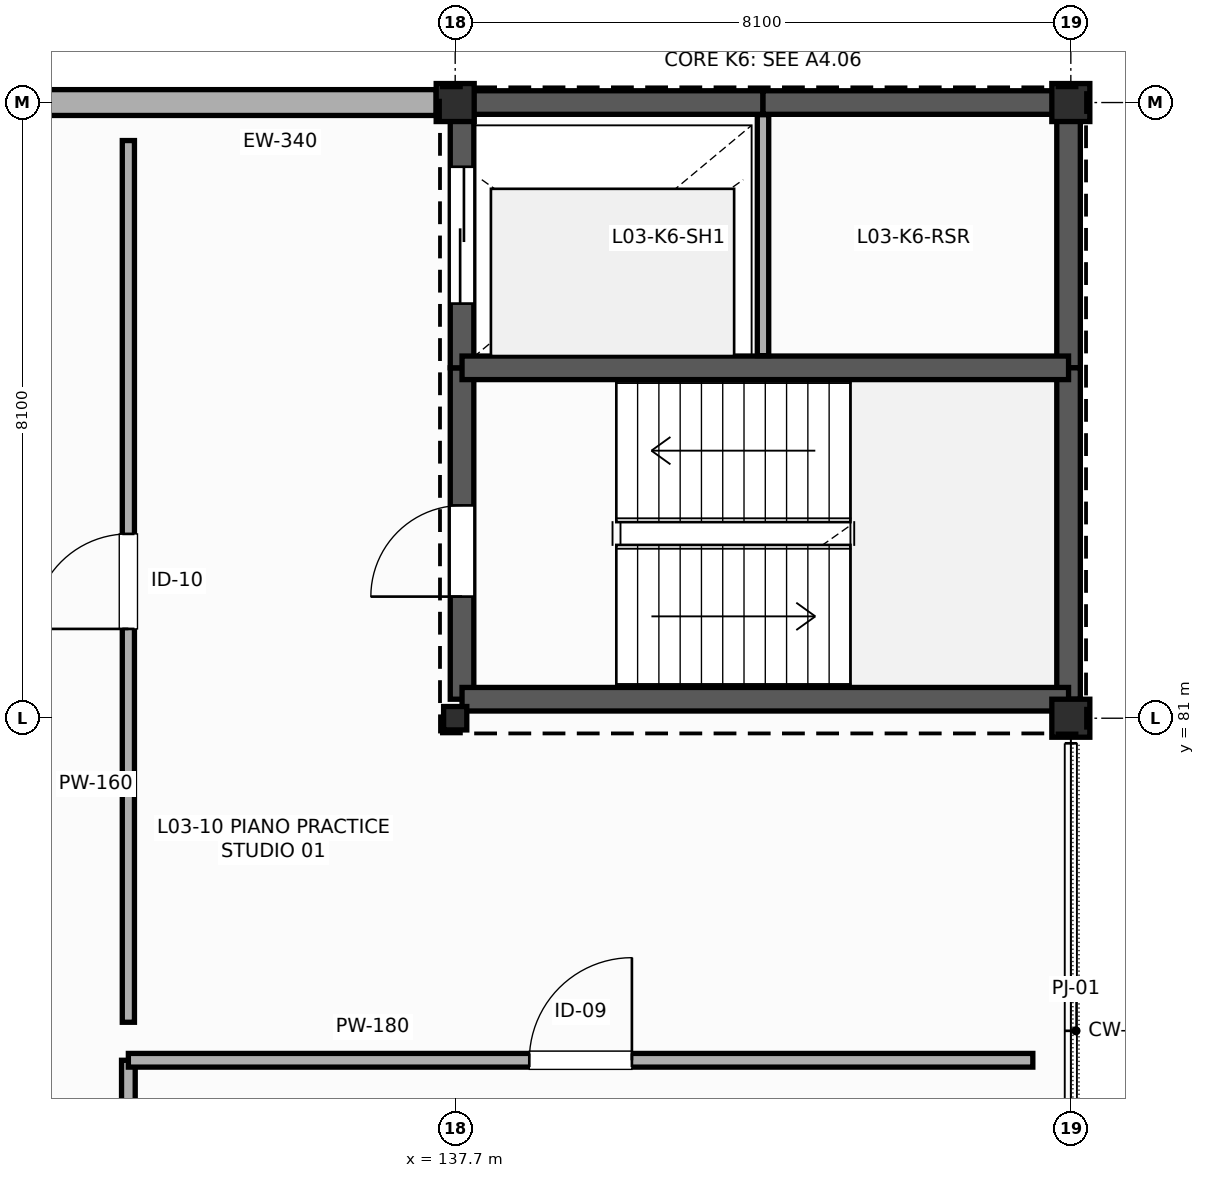
"""IFC4 building model, lengths in metres.
Left out: names, types, materials, properties, quantities, classifications, styles, units other than length and angle.
Written with IfcOpenShell. Run it as: python <this file> out.ifc"""

import sys

from ifc_helpers import new_model, si_unit, direction, frame, frame_2d, origin, origin_2d, place, context, subcontext, project, spatial, rectangle, i_section, extrude, element, fill, save


model = new_model("IFC4")
c1 = context("Model", 3, precision=1e-05, world=origin(), true_north=direction((0.0, 1.0)))
c2 = subcontext(c1, "Body", "Model", "MODEL_VIEW")
j1 = project(units=[si_unit("LENGTHUNIT", "METRE"), si_unit("PLANEANGLEUNIT", "RADIAN")], contexts=[c1])
p1 = place(None, origin())
s1 = spatial("IfcSite", under=j1, at=p1, CompositionType="ELEMENT")
p2 = place(p1, origin())
s2 = spatial("IfcBuilding", under=s1, at=p2, CompositionType="ELEMENT")
p3 = place(p2, frame((0.0, 0.0, 15.0)))
s3 = spatial("IfcBuildingStorey", under=s2, at=p3, CompositionType="ELEMENT", Elevation=15.0)
p4 = place(p3, frame((137.7, 81.0, 0.0), z_axis=(0.0, 0.0, 1.0), x_axis=(1.0, 0.0, 0.0)))
e1 = element("IfcColumn", 1, at=p4, inside=s3, PredefinedType="COLUMN", context=c2, shape_type="SweptSolid", body=[
    extrude(i_section(OverallWidth=0.305, OverallDepth=0.308, WebThickness=0.01, FlangeThickness=0.015, FilletRadius=0.015, at=origin_2d()), origin(), (0.0, 0.0, 1.0), 4.2),
])
for number, where, z_axis, x_axis in (
    (2, (137.7, 89.1, 0.0), (0.0, 0.0, 1.0), (1.0, 0.0, 0.0)),
    (3, (145.8, 81.0, 0.0), (0.0, 0.0, 1.0), (1.0, 0.0, 0.0)),
    (4, (145.8, 89.1, 0.0), (0.0, 0.0, 1.0), (1.0, 0.0, 0.0)),
):
    element("IfcColumn", number, at=place(p3, frame(where, z_axis=z_axis, x_axis=x_axis)), inside=s3, PredefinedType="COLUMN", context=c2, shape_type="SweptSolid", body=[
        extrude(rectangle(XDim=0.5, YDim=0.5, at=origin_2d()), origin(), (0.0, 0.0, 1.0), 4.2),
    ])
p5 = place(p3, frame((137.45, 89.1, 0.0), z_axis=(0.0, 0.0, 1.0), x_axis=(-1.0, 0.0, 0.0)))
e5 = element("IfcWall", 5, at=p5, inside=s3, PredefinedType="SOLIDWALL", context=c2, shape_type="SweptSolid", body=[
    extrude(rectangle(XDim=7.6, YDim=0.34, at=frame_2d((3.8, 0.0))), origin(), (0.0, 0.0, 1.0), 3.527),
])
p6 = place(p3, frame((137.79, 81.25, 0.0), z_axis=(0.0, 0.0, 1.0), x_axis=(0.0, 1.0, 0.0)))
e6 = element("IfcWall", 6, at=p6, inside=s3, PredefinedType="SHEAR", context=c2, shape_type="SweptSolid", body=[
    extrude(rectangle(XDim=4.36, YDim=0.31, at=frame_2d((2.18, 0.0))), origin(), (0.0, 0.0, 1.0), 4.2),
])
p7 = place(p6, frame((1.35, 0.0, 0.0)))
e7 = element("IfcOpeningElement", 7, at=p7, cuts=e6, PredefinedType="OPENING", context=c2, shape_type="SweptSolid", body=[
    extrude(rectangle(XDim=1.2, YDim=2.25, at=frame_2d((0.6, 1.125))), frame((0.0, 0.165, 0.0), z_axis=(0.0, -1.0, 0.0), x_axis=(1.0, 0.0, 0.0)), (0.0, 0.0, 1.0), 0.33),
])
p8 = place(p3, frame((137.79, 85.61, 0.0), z_axis=(0.0, 0.0, 1.0), x_axis=(0.0, 1.0, 0.0)))
e8 = element("IfcWall", 8, at=p8, inside=s3, PredefinedType="SHEAR", context=c2, shape_type="SweptSolid", body=[
    extrude(rectangle(XDim=3.49, YDim=0.31, at=frame_2d((1.745, 0.0))), origin(), (0.0, 0.0, 1.0), 4.2),
])
p9 = place(p8, frame((0.845, 0.0, 0.0)))
e9 = element("IfcOpeningElement", 9, at=p9, cuts=e8, PredefinedType="OPENING", context=c2, shape_type="SweptSolid", body=[
    extrude(rectangle(XDim=1.8, YDim=2.4, at=frame_2d((0.9, 1.2))), frame((0.0, 0.165, 0.0), z_axis=(0.0, -1.0, 0.0), x_axis=(1.0, 0.0, 0.0)), (0.0, 0.0, 1.0), 0.33),
])
p10 = place(p3, frame((137.79, 89.1, 0.0), z_axis=(0.0, 0.0, 1.0), x_axis=(1.0, 0.0, 0.0)))
e10 = element("IfcWall", 10, at=p10, inside=s3, PredefinedType="SHEAR", context=c2, shape_type="SweptSolid", body=[
    extrude(rectangle(XDim=3.96, YDim=0.31, at=frame_2d((1.98, 0.0))), origin(), (0.0, 0.0, 1.0), 4.2),
])
p11 = place(p3, frame((141.75, 89.1, 0.0), z_axis=(0.0, 0.0, 1.0), x_axis=(1.0, 0.0, 0.0)))
e11 = element("IfcWall", 11, at=p11, inside=s3, PredefinedType="SHEAR", context=c2, shape_type="SweptSolid", body=[
    extrude(rectangle(XDim=4.02, YDim=0.31, at=frame_2d((2.01, 0.0))), origin(), (0.0, 0.0, 1.0), 4.2),
])
p12 = place(p3, frame((145.77, 89.1, 0.0), z_axis=(0.0, 0.0, 1.0), x_axis=(0.0, -1.0, 0.0)))
e12 = element("IfcWall", 12, at=p12, inside=s3, PredefinedType="SHEAR", context=c2, shape_type="SweptSolid", body=[
    extrude(rectangle(XDim=3.49, YDim=0.31, at=frame_2d((1.745, 0.0))), origin(), (0.0, 0.0, 1.0), 4.2),
])
p13 = place(p3, frame((145.77, 85.61, 0.0), z_axis=(0.0, 0.0, 1.0), x_axis=(0.0, -1.0, 0.0)))
e13 = element("IfcWall", 13, at=p13, inside=s3, PredefinedType="SHEAR", context=c2, shape_type="SweptSolid", body=[
    extrude(rectangle(XDim=4.36, YDim=0.31, at=frame_2d((2.18, 0.0))), origin(), (0.0, 0.0, 1.0), 4.2),
])
for number, where, z_axis, x_axis in (
    (14, (145.77, 81.25, 0.0), (0.0, 0.0, 1.0), (-1.0, 0.0, 0.0)),
    (15, (137.79, 85.61, 0.0), (0.0, 0.0, 1.0), (1.0, 0.0, 0.0)),
):
    element("IfcWall", number, at=place(p3, frame(where, z_axis=z_axis, x_axis=x_axis)), inside=s3, PredefinedType="SHEAR", context=c2, shape_type="SweptSolid", body=[
        extrude(rectangle(XDim=7.98, YDim=0.31, at=frame_2d((3.99, 0.0))), origin(), (0.0, 0.0, 1.0), 4.2),
    ])
p14 = place(p3, frame((141.75, 85.77, 0.0), z_axis=(0.0, 0.0, 1.0), x_axis=(0.0, 1.0, 0.0)))
e16 = element("IfcWall", 16, at=p14, inside=s3, PredefinedType="PLUMBINGWALL", context=c2, shape_type="SweptSolid", body=[
    extrude(rectangle(XDim=3.17, YDim=0.15, at=frame_2d((1.585, 0.0))), origin(), (0.0, 0.0, 1.0), 3.85),
])
p15 = place(p3, frame((133.4, 67.0, 0.0), z_axis=(0.0, 0.0, 1.0), x_axis=(0.0, 1.0, 0.0)))
e17 = element("IfcWall", 17, at=p15, inside=s3, PredefinedType="PARTITIONING", context=c2, shape_type="SweptSolid", body=[
    extrude(rectangle(XDim=9.5, YDim=0.18, at=frame_2d((4.75, 0.0))), origin(), (0.0, 0.0, 1.0), 3.92),
])
p16 = place(p3, frame((133.4, 76.5, 0.0), z_axis=(0.0, 0.0, 1.0), x_axis=(1.0, 0.0, 0.0)))
e18 = element("IfcWall", 18, at=p16, inside=s3, PredefinedType="PARTITIONING", context=c2, shape_type="SweptSolid", body=[
    extrude(rectangle(XDim=11.9, YDim=0.18, at=frame_2d((5.95, 0.0))), origin(), (0.0, 0.0, 1.0), 3.92),
])
p17 = place(p16, frame((5.275, 0.0, 0.0)))
e19 = element("IfcOpeningElement", 19, at=p17, cuts=e18, PredefinedType="OPENING", context=c2, shape_type="SweptSolid", body=[
    extrude(rectangle(XDim=1.35, YDim=2.3, at=frame_2d((0.675, 1.15))), frame((0.0, 0.1, 0.0), z_axis=(0.0, -1.0, 0.0), x_axis=(1.0, 0.0, 0.0)), (0.0, 0.0, 1.0), 0.2),
])
p18 = place(p3, frame((133.4, 77.0, 0.0), z_axis=(0.0, 0.0, 1.0), x_axis=(0.0, 1.0, 0.0)))
e20 = element("IfcWall", 20, at=p18, inside=s3, PredefinedType="PARTITIONING", context=c2, shape_type="SweptSolid", body=[
    extrude(rectangle(XDim=11.6, YDim=0.16, at=frame_2d((5.8, 0.0))), origin(), (0.0, 0.0, 1.0), 3.92),
])
p19 = place(p18, frame((5.175, 0.0, 0.0)))
e21 = element("IfcOpeningElement", 21, at=p19, cuts=e20, PredefinedType="OPENING", context=c2, shape_type="SweptSolid", body=[
    extrude(rectangle(XDim=1.25, YDim=2.25, at=frame_2d((0.625, 1.125))), frame((0.0, 0.09, 0.0), z_axis=(0.0, -1.0, 0.0), x_axis=(1.0, 0.0, 0.0)), (0.0, 0.0, 1.0), 0.18),
])
p20 = place(p7, origin())
e22 = element("IfcDoor", 22, at=p20, inside=s3, OperationType="SINGLE_SWING_LEFT", PredefinedType="DOOR", context=c2, shape_type="SweptSolid", body=[
    extrude(rectangle(XDim=1.2, YDim=2.25, at=frame_2d((0.6, 1.125))), frame((0.0, 0.025, 0.0), z_axis=(0.0, -1.0, 0.0), x_axis=(1.0, 0.0, 0.0)), (0.0, 0.0, 1.0), 0.05),
])
fill(e7, e22)
p21 = place(p9, origin())
e23 = element("IfcDoor", 23, at=p21, inside=s3, OperationType="SLIDING_TO_LEFT", PredefinedType="DOOR", context=c2, shape_type="SweptSolid", body=[
    extrude(rectangle(XDim=1.8, YDim=2.4, at=frame_2d((0.9, 1.2))), frame((0.0, 0.025, 0.0), z_axis=(0.0, -1.0, 0.0), x_axis=(1.0, 0.0, 0.0)), (0.0, 0.0, 1.0), 0.05),
])
fill(e9, e23)
p22 = place(p17, origin())
e24 = element("IfcDoor", 24, at=p22, inside=s3, OperationType="SINGLE_SWING_RIGHT", PredefinedType="DOOR", context=c2, shape_type="SweptSolid", body=[
    extrude(rectangle(XDim=1.35, YDim=2.3, at=frame_2d((0.675, 1.15))), frame((0.0, 0.025, 0.0), z_axis=(0.0, -1.0, 0.0), x_axis=(1.0, 0.0, 0.0)), (0.0, 0.0, 1.0), 0.05),
])
fill(e19, e24)
p23 = place(p19, origin())
e25 = element("IfcDoor", 25, at=p23, inside=s3, OperationType="SINGLE_SWING_LEFT", PredefinedType="DOOR", context=c2, shape_type="SweptSolid", body=[
    extrude(rectangle(XDim=1.25, YDim=2.25, at=frame_2d((0.625, 1.125))), frame((0.0, 0.025, 0.0), z_axis=(0.0, -1.0, 0.0), x_axis=(1.0, 0.0, 0.0)), (0.0, 0.0, 1.0), 0.05),
])
fill(e21, e25)
save(model, sys.argv[1])
